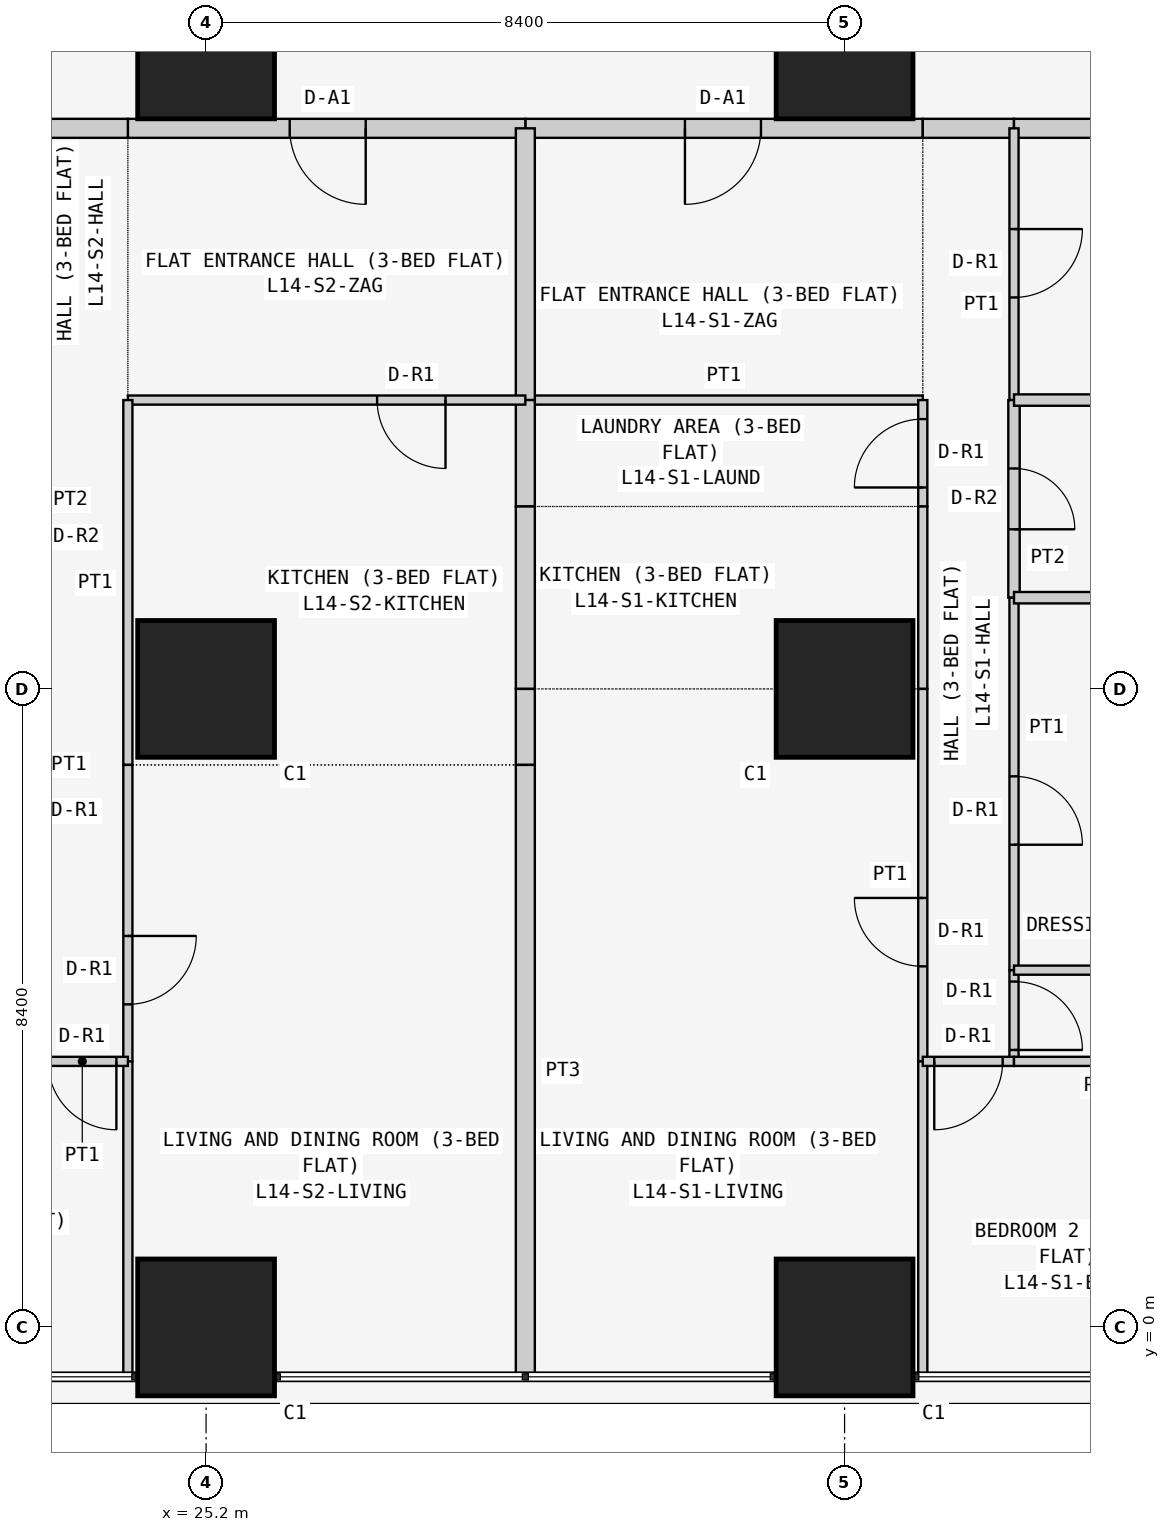
"""IFC4 building model, lengths in metres.
Left out: names, types, materials, properties, quantities, classifications, styles, units other than length and angle.
Written with IfcOpenShell. Run it as: python <this file> out.ifc"""

import sys

from ifc_helpers import new_model, si_unit, direction, frame, frame_2d, origin, origin_2d, place, context, subcontext, project, spatial, rectangle, extrude, element, fill, save


model = new_model("IFC4")
c1 = context("Model", 3, precision=1e-05, world=origin(), true_north=direction((0.0, 1.0)))
c2 = subcontext(c1, "Body", "Model", "MODEL_VIEW")
j1 = project(units=[si_unit("LENGTHUNIT", "METRE"), si_unit("PLANEANGLEUNIT", "RADIAN")], contexts=[c1])
p1 = place(None, origin())
s1 = spatial("IfcSite", under=j1, at=p1, CompositionType="ELEMENT")
p2 = place(p1, origin())
s2 = spatial("IfcBuilding", under=s1, at=p2, CompositionType="ELEMENT")
p3 = place(p2, frame((0.0, 0.0, 59.7)))
s3 = spatial("IfcBuildingStorey", under=s2, at=p3, CompositionType="ELEMENT", Elevation=59.7)
for number, where, z_axis, x_axis in (
    (1, (25.2, 0.0, 0.0), (0.0, 0.0, 1.0), (1.0, 0.0, 0.0)),
    (2, (25.2, 8.4, 0.0), (0.0, 0.0, 1.0), (1.0, 0.0, 0.0)),
    (3, (25.2, 16.8, 0.0), (0.0, 0.0, 1.0), (1.0, 0.0, 0.0)),
    (4, (33.6, 0.0, 0.0), (0.0, 0.0, 1.0), (1.0, 0.0, 0.0)),
    (5, (33.6, 8.4, 0.0), (0.0, 0.0, 1.0), (1.0, 0.0, 0.0)),
    (6, (33.6, 16.8, 0.0), (0.0, 0.0, 1.0), (1.0, 0.0, 0.0)),
):
    element("IfcColumn", number, at=place(p3, frame(where, z_axis=z_axis, x_axis=x_axis)), inside=s3, PredefinedType="COLUMN", context=c2, shape_type="SweptSolid", body=[
        extrude(rectangle(XDim=1.8, YDim=1.8, at=origin_2d()), origin(), (0.0, 0.0, 1.0), 3.6),
    ])
p4 = place(p3, frame((34.629, 15.775, 0.0), z_axis=(0.0, 0.0, 1.0), x_axis=(-1.0, 0.0, 0.0)))
e7 = element("IfcWall", 7, at=p4, inside=s3, PredefinedType="PARTITIONING", context=c2, shape_type="SweptSolid", body=[
    extrude(rectangle(XDim=5.229, YDim=0.25, at=frame_2d((2.615, 0.0))), origin(), (0.0, 0.0, 1.0), 3.45),
])
p5 = place(p4, frame((2.129, 0.0, 0.0)))
e8 = element("IfcOpeningElement", 8, at=p5, cuts=e7, PredefinedType="OPENING", context=c2, shape_type="SweptSolid", body=[
    extrude(rectangle(XDim=1.0, YDim=2.1, at=frame_2d((0.5, 1.05))), frame((0.0, 0.135, 0.0), z_axis=(0.0, -1.0, 0.0), x_axis=(1.0, 0.0, 0.0)), (0.0, 0.0, 1.0), 0.27),
])
p6 = place(p3, frame((35.829, 15.775, 0.0), z_axis=(0.0, 0.0, 1.0), x_axis=(-1.0, 0.0, 0.0)))
e9 = element("IfcWall", 9, at=p6, inside=s3, PredefinedType="PARTITIONING", context=c2, shape_type="SweptSolid", body=[
    extrude(rectangle(XDim=1.2, YDim=0.25, at=frame_2d((0.6, 0.0))), origin(), (0.0, 0.0, 1.0), 3.45),
])
p7 = place(p3, frame((42.7, 15.775, 0.0), z_axis=(0.0, 0.0, 1.0), x_axis=(-1.0, 0.0, 0.0)))
e10 = element("IfcWall", 10, at=p7, inside=s3, PredefinedType="PARTITIONING", context=c2, shape_type="SweptSolid", body=[
    extrude(rectangle(XDim=6.871, YDim=0.25, at=frame_2d((3.436, 0.0))), origin(), (0.0, 0.0, 1.0), 3.45),
])
p8 = place(p3, frame((29.4, 15.775, 0.0), z_axis=(0.0, 0.0, 1.0), x_axis=(-1.0, 0.0, 0.0)))
e11 = element("IfcWall", 11, at=p8, inside=s3, PredefinedType="PARTITIONING", context=c2, shape_type="SweptSolid", body=[
    extrude(rectangle(XDim=5.229, YDim=0.25, at=frame_2d((2.615, 0.0))), origin(), (0.0, 0.0, 1.0), 3.45),
])
p9 = place(p8, frame((2.1, 0.0, 0.0)))
e12 = element("IfcOpeningElement", 12, at=p9, cuts=e11, PredefinedType="OPENING", context=c2, shape_type="SweptSolid", body=[
    extrude(rectangle(XDim=1.0, YDim=2.1, at=frame_2d((0.5, 1.05))), frame((0.0, 0.135, 0.0), z_axis=(0.0, -1.0, 0.0), x_axis=(1.0, 0.0, 0.0)), (0.0, 0.0, 1.0), 0.27),
])
p10 = place(p3, frame((24.171, 15.775, 0.0), z_axis=(0.0, 0.0, 1.0), x_axis=(-1.0, 0.0, 0.0)))
e13 = element("IfcWall", 13, at=p10, inside=s3, PredefinedType="PARTITIONING", context=c2, shape_type="SweptSolid", body=[
    extrude(rectangle(XDim=1.2, YDim=0.25, at=frame_2d((0.6, 0.0))), origin(), (0.0, 0.0, 1.0), 3.45),
])
p11 = place(p3, frame((29.4, 12.2, 0.0), z_axis=(0.0, 0.0, 1.0), x_axis=(1.0, 0.0, 0.0)))
e14 = element("IfcWall", 14, at=p11, inside=s3, PredefinedType="PARTITIONING", context=c2, shape_type="SweptSolid", body=[
    extrude(rectangle(XDim=5.229, YDim=0.12, at=frame_2d((2.615, 0.0))), origin(), (0.0, 0.0, 1.0), 3.45),
])
p12 = place(p3, frame((29.4, 15.775, 0.0), z_axis=(0.0, 0.0, 1.0), x_axis=(0.0, -1.0, 0.0)))
e15 = element("IfcWall", 15, at=p12, inside=s3, PredefinedType="PARTITIONING", context=c2, shape_type="SweptSolid", body=[
    extrude(rectangle(XDim=3.575, YDim=0.25, at=frame_2d((1.788, 0.0))), origin(), (0.0, 0.0, 1.0), 2.848),
])
p13 = place(p3, frame((34.629, 10.8, 0.0), z_axis=(0.0, 0.0, 1.0), x_axis=(0.0, 1.0, 0.0)))
e16 = element("IfcWall", 16, at=p13, inside=s3, PredefinedType="PARTITIONING", context=c2, shape_type="SweptSolid", body=[
    extrude(rectangle(XDim=1.4, YDim=0.12, at=frame_2d((0.7, 0.0))), origin(), (0.0, 0.0, 1.0), 3.45),
])
p14 = place(p13, frame((0.25, 0.0, 0.0)))
e17 = element("IfcOpeningElement", 17, at=p14, cuts=e16, PredefinedType="OPENING", context=c2, shape_type="SweptSolid", body=[
    extrude(rectangle(XDim=0.9, YDim=2.1, at=frame_2d((0.45, 1.05))), frame((0.0, 0.07, 0.0), z_axis=(0.0, -1.0, 0.0), x_axis=(1.0, 0.0, 0.0)), (0.0, 0.0, 1.0), 0.14),
])
p15 = place(p3, frame((29.4, 12.2, 0.0), z_axis=(0.0, 0.0, 1.0), x_axis=(0.0, -1.0, 0.0)))
e18 = element("IfcWall", 18, at=p15, inside=s3, PredefinedType="PARTITIONING", context=c2, shape_type="SweptSolid", body=[
    extrude(rectangle(XDim=1.4, YDim=0.25, at=frame_2d((0.7, 0.0))), origin(), (0.0, 0.0, 1.0), 2.848),
])
p16 = place(p3, frame((34.629, 8.4, 0.0), z_axis=(0.0, 0.0, 1.0), x_axis=(0.0, 1.0, 0.0)))
e19 = element("IfcWall", 19, at=p16, inside=s3, PredefinedType="PARTITIONING", context=c2, shape_type="SweptSolid", body=[
    extrude(rectangle(XDim=2.4, YDim=0.12, at=frame_2d((1.2, 0.0))), origin(), (0.0, 0.0, 1.0), 3.45),
])
p17 = place(p3, frame((29.4, 10.8, 0.0), z_axis=(0.0, 0.0, 1.0), x_axis=(0.0, -1.0, 0.0)))
e20 = element("IfcWall", 20, at=p17, inside=s3, PredefinedType="PARTITIONING", context=c2, shape_type="SweptSolid", body=[
    extrude(rectangle(XDim=2.4, YDim=0.25, at=frame_2d((1.2, 0.0))), origin(), (0.0, 0.0, 1.0), 2.848),
])
p18 = place(p3, frame((34.629, 3.5, 0.0), z_axis=(0.0, 0.0, 1.0), x_axis=(0.0, 1.0, 0.0)))
e21 = element("IfcWall", 21, at=p18, inside=s3, PredefinedType="PARTITIONING", context=c2, shape_type="SweptSolid", body=[
    extrude(rectangle(XDim=4.9, YDim=0.12, at=frame_2d((2.45, 0.0))), origin(), (0.0, 0.0, 1.0), 3.45),
])
p19 = place(p18, frame((1.25, 0.0, 0.0)))
e22 = element("IfcOpeningElement", 22, at=p19, cuts=e21, PredefinedType="OPENING", context=c2, shape_type="SweptSolid", body=[
    extrude(rectangle(XDim=0.9, YDim=2.1, at=frame_2d((0.45, 1.05))), frame((0.0, 0.07, 0.0), z_axis=(0.0, -1.0, 0.0), x_axis=(1.0, 0.0, 0.0)), (0.0, 0.0, 1.0), 0.14),
])
p20 = place(p3, frame((34.629, -0.65, 0.0), z_axis=(0.0, 0.0, 1.0), x_axis=(0.0, 1.0, 0.0)))
e23 = element("IfcWall", 23, at=p20, inside=s3, PredefinedType="PARTITIONING", context=c2, shape_type="SweptSolid", body=[
    extrude(rectangle(XDim=4.15, YDim=0.12, at=frame_2d((2.075, 0.0))), origin(), (0.0, 0.0, 1.0), 3.45),
])
p21 = place(p3, frame((29.4, 8.4, 0.0), z_axis=(0.0, 0.0, 1.0), x_axis=(0.0, -1.0, 0.0)))
e24 = element("IfcWall", 24, at=p21, inside=s3, PredefinedType="PARTITIONING", context=c2, shape_type="SweptSolid", body=[
    extrude(rectangle(XDim=1.0, YDim=0.25, at=frame_2d((0.5, 0.0))), origin(), (0.0, 0.0, 1.0), 2.848),
])
p22 = place(p3, frame((29.4, 7.4, 0.0), z_axis=(0.0, 0.0, 1.0), x_axis=(0.0, -1.0, 0.0)))
e25 = element("IfcWall", 25, at=p22, inside=s3, PredefinedType="PARTITIONING", context=c2, shape_type="SweptSolid", body=[
    extrude(rectangle(XDim=8.05, YDim=0.25, at=frame_2d((4.025, 0.0))), origin(), (0.0, 0.0, 1.0), 2.848),
])
p23 = place(p3, frame((35.829, 12.2, 0.0), z_axis=(0.0, 0.0, 1.0), x_axis=(0.0, 1.0, 0.0)))
e26 = element("IfcWall", 26, at=p23, inside=s3, PredefinedType="PARTITIONING", context=c2, shape_type="SweptSolid", body=[
    extrude(rectangle(XDim=3.575, YDim=0.12, at=frame_2d((1.788, 0.0))), origin(), (0.0, 0.0, 1.0), 3.45),
])
p24 = place(p23, frame((1.35, 0.0, 0.0)))
e27 = element("IfcOpeningElement", 27, at=p24, cuts=e26, PredefinedType="OPENING", context=c2, shape_type="SweptSolid", body=[
    extrude(rectangle(XDim=0.9, YDim=2.1, at=frame_2d((0.45, 1.05))), frame((0.0, 0.07, 0.0), z_axis=(0.0, -1.0, 0.0), x_axis=(1.0, 0.0, 0.0)), (0.0, 0.0, 1.0), 0.14),
])
p25 = place(p3, frame((35.829, 9.6, 0.0), z_axis=(0.0, 0.0, 1.0), x_axis=(0.0, 1.0, 0.0)))
e28 = element("IfcWall", 28, at=p25, inside=s3, PredefinedType="PARTITIONING", context=c2, shape_type="SweptSolid", body=[
    extrude(rectangle(XDim=2.6, YDim=0.15, at=frame_2d((1.3, 0.0))), origin(), (0.0, 0.0, 1.0), 3.45),
])
p26 = place(p25, frame((0.9, 0.0, 0.0)))
e29 = element("IfcOpeningElement", 29, at=p26, cuts=e28, PredefinedType="OPENING", context=c2, shape_type="SweptSolid", body=[
    extrude(rectangle(XDim=0.8, YDim=2.1, at=frame_2d((0.4, 1.05))), frame((0.0, 0.085, 0.0), z_axis=(0.0, -1.0, 0.0), x_axis=(1.0, 0.0, 0.0)), (0.0, 0.0, 1.0), 0.17),
])
p27 = place(p3, frame((35.829, 4.7, 0.0), z_axis=(0.0, 0.0, 1.0), x_axis=(0.0, 1.0, 0.0)))
e30 = element("IfcWall", 30, at=p27, inside=s3, PredefinedType="PARTITIONING", context=c2, shape_type="SweptSolid", body=[
    extrude(rectangle(XDim=4.9, YDim=0.12, at=frame_2d((2.45, 0.0))), origin(), (0.0, 0.0, 1.0), 3.45),
])
p28 = place(p27, frame((1.65, 0.0, 0.0)))
e31 = element("IfcOpeningElement", 31, at=p28, cuts=e30, PredefinedType="OPENING", context=c2, shape_type="SweptSolid", body=[
    extrude(rectangle(XDim=0.9, YDim=2.1, at=frame_2d((0.45, 1.05))), frame((0.0, 0.07, 0.0), z_axis=(0.0, -1.0, 0.0), x_axis=(1.0, 0.0, 0.0)), (0.0, 0.0, 1.0), 0.14),
])
p29 = place(p3, frame((35.829, 3.5, 0.0), z_axis=(0.0, 0.0, 1.0), x_axis=(0.0, 1.0, 0.0)))
e32 = element("IfcWall", 32, at=p29, inside=s3, PredefinedType="PARTITIONING", context=c2, shape_type="SweptSolid", body=[
    extrude(rectangle(XDim=1.2, YDim=0.12, at=frame_2d((0.6, 0.0))), origin(), (0.0, 0.0, 1.0), 3.45),
])
p30 = place(p29, frame((0.15, 0.0, 0.0)))
e33 = element("IfcOpeningElement", 33, at=p30, cuts=e32, PredefinedType="OPENING", context=c2, shape_type="SweptSolid", body=[
    extrude(rectangle(XDim=0.9, YDim=2.1, at=frame_2d((0.45, 1.05))), frame((0.0, 0.07, 0.0), z_axis=(0.0, -1.0, 0.0), x_axis=(1.0, 0.0, 0.0)), (0.0, 0.0, 1.0), 0.14),
])
p31 = place(p3, frame((34.629, 3.5, 0.0), z_axis=(0.0, 0.0, 1.0), x_axis=(1.0, 0.0, 0.0)))
e34 = element("IfcWall", 34, at=p31, inside=s3, PredefinedType="PARTITIONING", context=c2, shape_type="SweptSolid", body=[
    extrude(rectangle(XDim=1.2, YDim=0.12, at=frame_2d((0.6, 0.0))), origin(), (0.0, 0.0, 1.0), 3.45),
])
p32 = place(p31, frame((0.151, 0.0, 0.0)))
e35 = element("IfcOpeningElement", 35, at=p32, cuts=e34, PredefinedType="OPENING", context=c2, shape_type="SweptSolid", body=[
    extrude(rectangle(XDim=0.9, YDim=2.1, at=frame_2d((0.45, 1.05))), frame((0.0, 0.07, 0.0), z_axis=(0.0, -1.0, 0.0), x_axis=(1.0, 0.0, 0.0)), (0.0, 0.0, 1.0), 0.14),
])
for number, where, z_axis, x_axis in (
    (36, (35.829, 12.2, 0.0), (0.0, 0.0, 1.0), (1.0, 0.0, 0.0)),
    (37, (35.829, 9.6, 0.0), (0.0, 0.0, 1.0), (1.0, 0.0, 0.0)),
):
    element("IfcWall", number, at=place(p3, frame(where, z_axis=z_axis, x_axis=x_axis)), inside=s3, PredefinedType="PARTITIONING", context=c2, shape_type="SweptSolid", body=[
        extrude(rectangle(XDim=2.971, YDim=0.15, at=frame_2d((1.485, 0.0))), origin(), (0.0, 0.0, 1.0), 3.45),
    ])
for number, where, z_axis, x_axis in (
    (38, (35.829, 4.7, 0.0), (0.0, 0.0, 1.0), (1.0, 0.0, 0.0)),
    (39, (35.829, 3.5, 0.0), (0.0, 0.0, 1.0), (1.0, 0.0, 0.0)),
):
    element("IfcWall", number, at=place(p3, frame(where, z_axis=z_axis, x_axis=x_axis)), inside=s3, PredefinedType="PARTITIONING", context=c2, shape_type="SweptSolid", body=[
        extrude(rectangle(XDim=2.285, YDim=0.12, at=frame_2d((1.143, 0.0))), origin(), (0.0, 0.0, 1.0), 3.45),
    ])
p33 = place(p3, frame((29.4, 12.2, 0.0), z_axis=(0.0, 0.0, 1.0), x_axis=(-1.0, 0.0, 0.0)))
e40 = element("IfcWall", 40, at=p33, inside=s3, PredefinedType="PARTITIONING", context=c2, shape_type="SweptSolid", body=[
    extrude(rectangle(XDim=5.229, YDim=0.12, at=frame_2d((2.615, 0.0))), origin(), (0.0, 0.0, 1.0), 3.45),
])
p34 = place(p33, frame((1.05, 0.0, 0.0)))
e41 = element("IfcOpeningElement", 41, at=p34, cuts=e40, PredefinedType="OPENING", context=c2, shape_type="SweptSolid", body=[
    extrude(rectangle(XDim=0.9, YDim=2.1, at=frame_2d((0.45, 1.05))), frame((0.0, 0.07, 0.0), z_axis=(0.0, -1.0, 0.0), x_axis=(1.0, 0.0, 0.0)), (0.0, 0.0, 1.0), 0.14),
])
p35 = place(p3, frame((24.171, 7.4, 0.0), z_axis=(0.0, 0.0, 1.0), x_axis=(0.0, 1.0, 0.0)))
e42 = element("IfcWall", 42, at=p35, inside=s3, PredefinedType="PARTITIONING", context=c2, shape_type="SweptSolid", body=[
    extrude(rectangle(XDim=4.8, YDim=0.12, at=frame_2d((2.4, 0.0))), origin(), (0.0, 0.0, 1.0), 3.45),
])
p36 = place(p3, frame((24.171, 3.5, 0.0), z_axis=(0.0, 0.0, 1.0), x_axis=(0.0, 1.0, 0.0)))
e43 = element("IfcWall", 43, at=p36, inside=s3, PredefinedType="PARTITIONING", context=c2, shape_type="SweptSolid", body=[
    extrude(rectangle(XDim=3.9, YDim=0.12, at=frame_2d((1.95, 0.0))), origin(), (0.0, 0.0, 1.0), 3.45),
])
p37 = place(p36, frame((0.75, 0.0, 0.0)))
e44 = element("IfcOpeningElement", 44, at=p37, cuts=e43, PredefinedType="OPENING", context=c2, shape_type="SweptSolid", body=[
    extrude(rectangle(XDim=0.9, YDim=2.1, at=frame_2d((0.45, 1.05))), frame((0.0, 0.07, 0.0), z_axis=(0.0, -1.0, 0.0), x_axis=(1.0, 0.0, 0.0)), (0.0, 0.0, 1.0), 0.14),
])
p38 = place(p3, frame((24.171, -0.65, 0.0), z_axis=(0.0, 0.0, 1.0), x_axis=(0.0, 1.0, 0.0)))
e45 = element("IfcWall", 45, at=p38, inside=s3, PredefinedType="PARTITIONING", context=c2, shape_type="SweptSolid", body=[
    extrude(rectangle(XDim=4.15, YDim=0.12, at=frame_2d((2.075, 0.0))), origin(), (0.0, 0.0, 1.0), 3.45),
])
p39 = place(p3, frame((24.171, 3.5, 0.0), z_axis=(0.0, 0.0, 1.0), x_axis=(-1.0, 0.0, 0.0)))
e46 = element("IfcWall", 46, at=p39, inside=s3, PredefinedType="PARTITIONING", context=c2, shape_type="SweptSolid", body=[
    extrude(rectangle(XDim=1.2, YDim=0.12, at=frame_2d((0.6, 0.0))), origin(), (0.0, 0.0, 1.0), 3.45),
])
p40 = place(p39, frame((0.151, 0.0, 0.0)))
e47 = element("IfcOpeningElement", 47, at=p40, cuts=e46, PredefinedType="OPENING", context=c2, shape_type="SweptSolid", body=[
    extrude(rectangle(XDim=0.9, YDim=2.1, at=frame_2d((0.45, 1.05))), frame((0.0, 0.07, 0.0), z_axis=(0.0, -1.0, 0.0), x_axis=(1.0, 0.0, 0.0)), (0.0, 0.0, 1.0), 0.14),
])
p41 = place(p5, origin())
e48 = element("IfcDoor", 48, at=p41, inside=s3, OperationType="SINGLE_SWING_RIGHT", PredefinedType="DOOR", context=c2, shape_type="SweptSolid", body=[
    extrude(rectangle(XDim=1.0, YDim=2.1, at=frame_2d((0.5, 1.05))), frame((0.0, 0.025, 0.0), z_axis=(0.0, -1.0, 0.0), x_axis=(1.0, 0.0, 0.0)), (0.0, 0.0, 1.0), 0.05),
])
fill(e8, e48)
p42 = place(p14, origin())
e49 = element("IfcDoor", 49, at=p42, inside=s3, OperationType="SINGLE_SWING_LEFT", PredefinedType="DOOR", context=c2, shape_type="SweptSolid", body=[
    extrude(rectangle(XDim=0.9, YDim=2.1, at=frame_2d((0.45, 1.05))), frame((0.0, 0.025, 0.0), z_axis=(0.0, -1.0, 0.0), x_axis=(1.0, 0.0, 0.0)), (0.0, 0.0, 1.0), 0.05),
])
fill(e17, e49)
p43 = place(p19, origin())
e50 = element("IfcDoor", 50, at=p43, inside=s3, OperationType="SINGLE_SWING_RIGHT", PredefinedType="DOOR", context=c2, shape_type="SweptSolid", body=[
    extrude(rectangle(XDim=0.9, YDim=2.1, at=frame_2d((0.45, 1.05))), frame((0.0, 0.025, 0.0), z_axis=(0.0, -1.0, 0.0), x_axis=(1.0, 0.0, 0.0)), (0.0, 0.0, 1.0), 0.05),
])
fill(e22, e50)
p44 = place(p24, frame((0.9, 0.0, 0.0), z_axis=(0.0, 0.0, 1.0), x_axis=(-1.0, 0.0, 0.0)))
e51 = element("IfcDoor", 51, at=p44, inside=s3, OperationType="SINGLE_SWING_LEFT", PredefinedType="DOOR", context=c2, shape_type="SweptSolid", body=[
    extrude(rectangle(XDim=0.9, YDim=2.1, at=frame_2d((0.45, 1.05))), frame((0.0, 0.025, 0.0), z_axis=(0.0, -1.0, 0.0), x_axis=(1.0, 0.0, 0.0)), (0.0, 0.0, 1.0), 0.05),
])
fill(e27, e51)
p45 = place(p26, frame((0.8, 0.0, 0.0), z_axis=(0.0, 0.0, 1.0), x_axis=(-1.0, 0.0, 0.0)))
e52 = element("IfcDoor", 52, at=p45, inside=s3, OperationType="SINGLE_SWING_RIGHT", PredefinedType="DOOR", context=c2, shape_type="SweptSolid", body=[
    extrude(rectangle(XDim=0.8, YDim=2.1, at=frame_2d((0.4, 1.05))), frame((0.0, 0.025, 0.0), z_axis=(0.0, -1.0, 0.0), x_axis=(1.0, 0.0, 0.0)), (0.0, 0.0, 1.0), 0.05),
])
fill(e29, e52)
p46 = place(p28, frame((0.9, 0.0, 0.0), z_axis=(0.0, 0.0, 1.0), x_axis=(-1.0, 0.0, 0.0)))
e53 = element("IfcDoor", 53, at=p46, inside=s3, OperationType="SINGLE_SWING_RIGHT", PredefinedType="DOOR", context=c2, shape_type="SweptSolid", body=[
    extrude(rectangle(XDim=0.9, YDim=2.1, at=frame_2d((0.45, 1.05))), frame((0.0, 0.025, 0.0), z_axis=(0.0, -1.0, 0.0), x_axis=(1.0, 0.0, 0.0)), (0.0, 0.0, 1.0), 0.05),
])
fill(e31, e53)
p47 = place(p30, frame((0.9, 0.0, 0.0), z_axis=(0.0, 0.0, 1.0), x_axis=(-1.0, 0.0, 0.0)))
e54 = element("IfcDoor", 54, at=p47, inside=s3, OperationType="SINGLE_SWING_RIGHT", PredefinedType="DOOR", context=c2, shape_type="SweptSolid", body=[
    extrude(rectangle(XDim=0.9, YDim=2.1, at=frame_2d((0.45, 1.05))), frame((0.0, 0.025, 0.0), z_axis=(0.0, -1.0, 0.0), x_axis=(1.0, 0.0, 0.0)), (0.0, 0.0, 1.0), 0.05),
])
fill(e33, e54)
p48 = place(p32, frame((0.9, 0.0, 0.0), z_axis=(0.0, 0.0, 1.0), x_axis=(-1.0, 0.0, 0.0)))
e55 = element("IfcDoor", 55, at=p48, inside=s3, OperationType="SINGLE_SWING_RIGHT", PredefinedType="DOOR", context=c2, shape_type="SweptSolid", body=[
    extrude(rectangle(XDim=0.9, YDim=2.1, at=frame_2d((0.45, 1.05))), frame((0.0, 0.025, 0.0), z_axis=(0.0, -1.0, 0.0), x_axis=(1.0, 0.0, 0.0)), (0.0, 0.0, 1.0), 0.05),
])
fill(e35, e55)
p49 = place(p9, origin())
e56 = element("IfcDoor", 56, at=p49, inside=s3, OperationType="SINGLE_SWING_LEFT", PredefinedType="DOOR", context=c2, shape_type="SweptSolid", body=[
    extrude(rectangle(XDim=1.0, YDim=2.1, at=frame_2d((0.5, 1.05))), frame((0.0, 0.025, 0.0), z_axis=(0.0, -1.0, 0.0), x_axis=(1.0, 0.0, 0.0)), (0.0, 0.0, 1.0), 0.05),
])
fill(e12, e56)
p50 = place(p34, origin())
e57 = element("IfcDoor", 57, at=p50, inside=s3, OperationType="SINGLE_SWING_LEFT", PredefinedType="DOOR", context=c2, shape_type="SweptSolid", body=[
    extrude(rectangle(XDim=0.9, YDim=2.1, at=frame_2d((0.45, 1.05))), frame((0.0, 0.025, 0.0), z_axis=(0.0, -1.0, 0.0), x_axis=(1.0, 0.0, 0.0)), (0.0, 0.0, 1.0), 0.05),
])
fill(e41, e57)
p51 = place(p37, frame((0.9, 0.0, 0.0), z_axis=(0.0, 0.0, 1.0), x_axis=(-1.0, 0.0, 0.0)))
e58 = element("IfcDoor", 58, at=p51, inside=s3, OperationType="SINGLE_SWING_LEFT", PredefinedType="DOOR", context=c2, shape_type="SweptSolid", body=[
    extrude(rectangle(XDim=0.9, YDim=2.1, at=frame_2d((0.45, 1.05))), frame((0.0, 0.025, 0.0), z_axis=(0.0, -1.0, 0.0), x_axis=(1.0, 0.0, 0.0)), (0.0, 0.0, 1.0), 0.05),
])
fill(e44, e58)
p52 = place(p40, origin())
e59 = element("IfcDoor", 59, at=p52, inside=s3, OperationType="SINGLE_SWING_LEFT", PredefinedType="DOOR", context=c2, shape_type="SweptSolid", body=[
    extrude(rectangle(XDim=0.9, YDim=2.1, at=frame_2d((0.45, 1.05))), frame((0.0, 0.025, 0.0), z_axis=(0.0, -1.0, 0.0), x_axis=(1.0, 0.0, 0.0)), (0.0, 0.0, 1.0), 0.05),
])
fill(e47, e59)
save(model, sys.argv[1])
